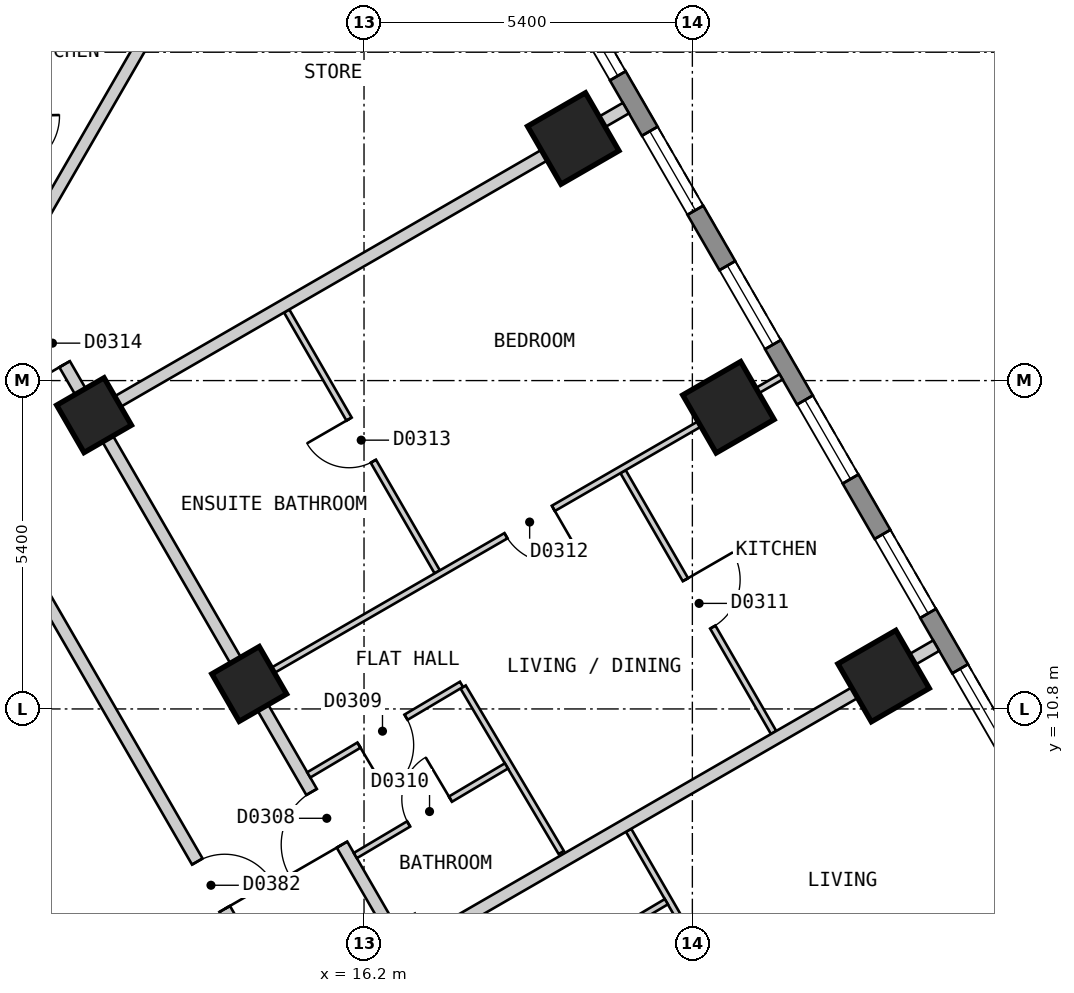
"""IFC4 building model, lengths in metres.
Left out: names, types, materials, properties, quantities, classifications, styles, units other than length and angle.
Written with IfcOpenShell. Run it as: python <this file> out.ifc"""

import sys

from ifc_helpers import new_model, si_unit, direction, frame, frame_2d, origin, origin_2d, place, context, subcontext, project, spatial, polyline, rectangle, outline, extrude, element, fill, save


model = new_model("IFC4")
c1 = context("Model", 3, precision=1e-05, world=origin(), true_north=direction((0.0, 1.0)))
c2 = subcontext(c1, "Body", "Model", "MODEL_VIEW")
j1 = project(units=[si_unit("LENGTHUNIT", "METRE"), si_unit("PLANEANGLEUNIT", "RADIAN")], contexts=[c1])
p1 = place(None, origin())
s1 = spatial("IfcSite", under=j1, at=p1, CompositionType="ELEMENT")
p2 = place(p1, origin())
s2 = spatial("IfcBuilding", under=s1, at=p2, CompositionType="ELEMENT")
p3 = place(p2, frame((0.0, 0.0, 59.4)))
s3 = spatial("IfcBuildingStorey", under=s2, at=p3, CompositionType="ELEMENT", Elevation=59.4)
for number, where, z_axis, x_axis in (
    (1, (27.297, 6.921, 0.0), (0.0, 0.0, 1.0), (-0.5, 0.866, 0.0)),
    (2, (24.745, 11.341, 0.0), (0.0, 0.0, 1.0), (-0.5, 0.866, 0.0)),
    (3, (22.193, 15.761, 0.0), (0.0, 0.0, 1.0), (-0.5, 0.866, 0.0)),
    (4, (19.641, 20.181, 0.0), (0.0, 0.0, 1.0), (-0.5, 0.866, 0.0)),
):
    element("IfcColumn", number, at=place(p3, frame(where, z_axis=z_axis, x_axis=x_axis)), inside=s3, PredefinedType="COLUMN", context=c2, shape_type="SweptSolid", body=[
        extrude(rectangle(XDim=1.1, YDim=1.1, at=origin_2d()), origin(), (0.0, 0.0, 1.0), 3.0),
    ])
for number, where, z_axis, x_axis in (
    (5, (14.312, 11.211, 0.0), (0.0, 0.0, 1.0), (-0.5, 0.866, 0.0)),
    (6, (11.76, 15.631, 0.0), (0.0, 0.0, 1.0), (-0.5, 0.866, 0.0)),
):
    element("IfcColumn", number, at=place(p3, frame(where, z_axis=z_axis, x_axis=x_axis)), inside=s3, PredefinedType="COLUMN", context=c2, shape_type="SweptSolid", body=[
        extrude(rectangle(XDim=0.9, YDim=0.9, at=origin_2d()), origin(), (0.0, 0.0, 1.0), 3.0),
    ])
p4 = place(p3, frame((31.22, 2.425, 0.0), z_axis=(0.0, 0.0, 1.0), x_axis=(-0.500001938803, 0.866024284413, 0.0)))
e7 = element("IfcWall", 7, at=p4, inside=s3, PredefinedType="SOLIDWALL", context=c2, shape_type="SweptSolid", body=[
    extrude(outline(polyline([(0.0, -0.15), (27.02, -0.15), (26.94, 0.15), (0.08, 0.15), (0.0, -0.15)])), origin(), (0.0, 0.0, 1.0), 2.6),
])
p5 = place(p4, frame((1.277, 0.0, 0.15)))
e8 = element("IfcOpeningElement", 8, at=p5, cuts=e7, PredefinedType="OPENING", context=c2, shape_type="SweptSolid", body=[
    extrude(rectangle(XDim=1.5, YDim=2.1, at=frame_2d((0.75, 1.05))), frame((0.0, 0.16, 0.0), z_axis=(0.0, -1.0, 0.0), x_axis=(1.0, 0.0, 0.0)), (0.0, 0.0, 1.0), 0.32),
])
p6 = place(p4, frame((3.829, 0.0, 0.15)))
e9 = element("IfcOpeningElement", 9, at=p6, cuts=e7, PredefinedType="OPENING", context=c2, shape_type="SweptSolid", body=[
    extrude(rectangle(XDim=1.5, YDim=2.1, at=frame_2d((0.75, 1.05))), frame((0.0, 0.16, 0.0), z_axis=(0.0, -1.0, 0.0), x_axis=(1.0, 0.0, 0.0)), (0.0, 0.0, 1.0), 0.32),
])
p7 = place(p4, frame((6.382, 0.0, 0.15)))
e10 = element("IfcOpeningElement", 10, at=p7, cuts=e7, PredefinedType="OPENING", context=c2, shape_type="SweptSolid", body=[
    extrude(rectangle(XDim=1.5, YDim=2.1, at=frame_2d((0.75, 1.05))), frame((0.0, 0.16, 0.0), z_axis=(0.0, -1.0, 0.0), x_axis=(1.0, 0.0, 0.0)), (0.0, 0.0, 1.0), 0.32),
])
p8 = place(p4, frame((8.933, 0.0, 0.15)))
e11 = element("IfcOpeningElement", 11, at=p8, cuts=e7, PredefinedType="OPENING", context=c2, shape_type="SweptSolid", body=[
    extrude(rectangle(XDim=1.5, YDim=2.1, at=frame_2d((0.75, 1.05))), frame((0.0, 0.16, 0.0), z_axis=(0.0, -1.0, 0.0), x_axis=(1.0, 0.0, 0.0)), (0.0, 0.0, 1.0), 0.32),
])
p9 = place(p4, frame((11.485, 0.0, 0.15)))
e12 = element("IfcOpeningElement", 12, at=p9, cuts=e7, PredefinedType="OPENING", context=c2, shape_type="SweptSolid", body=[
    extrude(rectangle(XDim=1.5, YDim=2.1, at=frame_2d((0.75, 1.05))), frame((0.0, 0.16, 0.0), z_axis=(0.0, -1.0, 0.0), x_axis=(1.0, 0.0, 0.0)), (0.0, 0.0, 1.0), 0.32),
])
p10 = place(p4, frame((14.037, 0.0, 0.15)))
e13 = element("IfcOpeningElement", 13, at=p10, cuts=e7, PredefinedType="OPENING", context=c2, shape_type="SweptSolid", body=[
    extrude(rectangle(XDim=1.5, YDim=2.1, at=frame_2d((0.75, 1.05))), frame((0.0, 0.16, 0.0), z_axis=(0.0, -1.0, 0.0), x_axis=(1.0, 0.0, 0.0)), (0.0, 0.0, 1.0), 0.32),
])
p11 = place(p4, frame((16.589, 0.0, 0.15)))
e14 = element("IfcOpeningElement", 14, at=p11, cuts=e7, PredefinedType="OPENING", context=c2, shape_type="SweptSolid", body=[
    extrude(rectangle(XDim=1.5, YDim=2.1, at=frame_2d((0.75, 1.05))), frame((0.0, 0.16, 0.0), z_axis=(0.0, -1.0, 0.0), x_axis=(1.0, 0.0, 0.0)), (0.0, 0.0, 1.0), 0.32),
])
p12 = place(p4, frame((19.141, 0.0, 0.15)))
e15 = element("IfcOpeningElement", 15, at=p12, cuts=e7, PredefinedType="OPENING", context=c2, shape_type="SweptSolid", body=[
    extrude(rectangle(XDim=1.5, YDim=2.1, at=frame_2d((0.75, 1.05))), frame((0.0, 0.16, 0.0), z_axis=(0.0, -1.0, 0.0), x_axis=(1.0, 0.0, 0.0)), (0.0, 0.0, 1.0), 0.32),
])
p13 = place(p4, frame((21.693, 0.0, 0.15)))
e16 = element("IfcOpeningElement", 16, at=p13, cuts=e7, PredefinedType="OPENING", context=c2, shape_type="SweptSolid", body=[
    extrude(rectangle(XDim=1.5, YDim=2.1, at=frame_2d((0.75, 1.05))), frame((0.0, 0.16, 0.0), z_axis=(0.0, -1.0, 0.0), x_axis=(1.0, 0.0, 0.0)), (0.0, 0.0, 1.0), 0.32),
])
p14 = place(p4, frame((24.244, 0.0, 0.15)))
e17 = element("IfcOpeningElement", 17, at=p14, cuts=e7, PredefinedType="OPENING", context=c2, shape_type="SweptSolid", body=[
    extrude(rectangle(XDim=1.5, YDim=2.1, at=frame_2d((0.75, 1.05))), frame((0.0, 0.16, 0.0), z_axis=(0.0, -1.0, 0.0), x_axis=(1.0, 0.0, 0.0)), (0.0, 0.0, 1.0), 0.32),
])
p15 = place(p3, frame((9.18, 15.7, 0.0), z_axis=(0.0, 0.0, 1.0), x_axis=(0.500003652032, -0.866023295272, 0.0)))
e18 = element("IfcWall", 18, at=p15, inside=s3, PredefinedType="PARTITIONING", context=c2, shape_type="SweptSolid", body=[
    extrude(rectangle(XDim=18.012, YDim=0.2, at=frame_2d((9.006, 0.0))), origin(), (0.0, 0.0, 1.0), 2.6),
])
p16 = place(p15, frame((8.556, 0.0, 0.0)))
e19 = element("IfcOpeningElement", 19, at=p16, cuts=e18, PredefinedType="OPENING", context=c2, shape_type="SweptSolid", body=[
    extrude(rectangle(XDim=0.9, YDim=2.1, at=frame_2d((0.45, 1.05))), frame((0.0, 0.11, 0.0), z_axis=(0.0, -1.0, 0.0), x_axis=(1.0, 0.0, 0.0)), (0.0, 0.0, 1.0), 0.22),
])
p17 = place(p3, frame((10.45, 17.9, 0.0), z_axis=(0.0, 0.0, 1.0), x_axis=(0.500034352617, -0.866005569383, 0.0)))
e20 = element("IfcWall", 20, at=p17, inside=s3, PredefinedType="PARTITIONING", context=c2, shape_type="SweptSolid", body=[
    extrude(rectangle(XDim=20.553, YDim=0.2, at=frame_2d((10.276, 0.0))), origin(), (0.0, 0.0, 1.0), 2.6),
])
p18 = place(p17, frame((14.903, 0.0, 0.0)))
e21 = element("IfcOpeningElement", 21, at=p18, cuts=e20, PredefinedType="OPENING", context=c2, shape_type="SweptSolid", body=[
    extrude(rectangle(XDim=1.0, YDim=2.1, at=frame_2d((0.5, 1.05))), frame((0.0, 0.11, 0.0), z_axis=(0.0, -1.0, 0.0), x_axis=(1.0, 0.0, 0.0)), (0.0, 0.0, 1.0), 0.22),
])
p19 = place(p17, frame((9.775, 0.0, 0.0)))
e22 = element("IfcOpeningElement", 22, at=p19, cuts=e20, PredefinedType="OPENING", context=c2, shape_type="SweptSolid", body=[
    extrude(rectangle(XDim=1.0, YDim=2.1, at=frame_2d((0.5, 1.05))), frame((0.0, 0.11, 0.0), z_axis=(0.0, -1.0, 0.0), x_axis=(1.0, 0.0, 0.0)), (0.0, 0.0, 1.0), 0.22),
])
p20 = place(p17, frame((0.852, 0.0, 0.0)))
e23 = element("IfcOpeningElement", 23, at=p20, cuts=e20, PredefinedType="OPENING", context=c2, shape_type="SweptSolid", body=[
    extrude(rectangle(XDim=0.8, YDim=2.1, at=frame_2d((0.4, 1.05))), frame((0.0, 0.11, 0.0), z_axis=(0.0, -1.0, 0.0), x_axis=(1.0, 0.0, 0.0)), (0.0, 0.0, 1.0), 0.22),
])
p21 = place(p3, frame((17.83, 11.161, 0.0), z_axis=(0.0, 0.0, 1.0), x_axis=(0.510041341082, -0.860149888326, 0.0)))
e24 = element("IfcWall", 24, at=p21, inside=s3, PredefinedType="PARTITIONING", context=c2, shape_type="SweptSolid", body=[
    extrude(rectangle(XDim=3.165, YDim=0.1, at=frame_2d((1.582, 0.0))), origin(), (0.0, 0.0, 1.0), 2.6),
])
p22 = place(p3, frame((14.928, 17.344, 0.0), z_axis=(0.0, 0.0, 1.0), x_axis=(0.499881743012, -0.866093668724, 0.0)))
e25 = element("IfcWall", 25, at=p22, inside=s3, PredefinedType="PARTITIONING", context=c2, shape_type="SweptSolid", body=[
    extrude(rectangle(XDim=4.953, YDim=0.1, at=frame_2d((2.477, 0.0))), origin(), (0.0, 0.0, 1.0), 2.6),
])
p23 = place(p22, frame((2.052, 0.0, 0.0)))
e26 = element("IfcOpeningElement", 26, at=p23, cuts=e25, PredefinedType="OPENING", context=c2, shape_type="SweptSolid", body=[
    extrude(rectangle(XDim=0.8, YDim=2.1, at=frame_2d((0.4, 1.05))), frame((0.0, 0.06, 0.0), z_axis=(0.0, -1.0, 0.0), x_axis=(1.0, 0.0, 0.0)), (0.0, 0.0, 1.0), 0.12),
])
p24 = place(p3, frame((20.551, 8.805, 0.0), z_axis=(0.0, 0.0, 1.0), x_axis=(0.499984387913, -0.86603441724, 0.0)))
e27 = element("IfcWall", 27, at=p24, inside=s3, PredefinedType="PARTITIONING", context=c2, shape_type="SweptSolid", body=[
    extrude(rectangle(XDim=10.058, YDim=0.1, at=frame_2d((5.029, 0.0))), origin(), (0.0, 0.0, 1.0), 2.6),
])
p25 = place(p24, frame((1.978, 0.0, 0.0)))
e28 = element("IfcOpeningElement", 28, at=p25, cuts=e27, PredefinedType="OPENING", context=c2, shape_type="SweptSolid", body=[
    extrude(rectangle(XDim=0.9, YDim=2.1, at=frame_2d((0.45, 1.05))), frame((0.0, 0.06, 0.0), z_axis=(0.0, -1.0, 0.0), x_axis=(1.0, 0.0, 0.0)), (0.0, 0.0, 1.0), 0.12),
])
p26 = place(p24, frame((7.157, 0.0, 0.0)))
e29 = element("IfcOpeningElement", 29, at=p26, cuts=e27, PredefinedType="OPENING", context=c2, shape_type="SweptSolid", body=[
    extrude(rectangle(XDim=0.8, YDim=2.1, at=frame_2d((0.4, 1.05))), frame((0.0, 0.06, 0.0), z_axis=(0.0, -1.0, 0.0), x_axis=(1.0, 0.0, 0.0)), (0.0, 0.0, 1.0), 0.12),
])
p27 = place(p3, frame((20.46, 14.703, 0.0), z_axis=(0.0, 0.0, 1.0), x_axis=(0.499903082856, -0.866081351693, 0.0)))
e30 = element("IfcWall", 30, at=p27, inside=s3, PredefinedType="PARTITIONING", context=c2, shape_type="SweptSolid", body=[
    extrude(rectangle(XDim=4.953, YDim=0.1, at=frame_2d((2.477, 0.0))), origin(), (0.0, 0.0, 1.0), 2.6),
])
p28 = place(p27, frame((2.052, 0.0, 0.0)))
e31 = element("IfcOpeningElement", 31, at=p28, cuts=e30, PredefinedType="OPENING", context=c2, shape_type="SweptSolid", body=[
    extrude(rectangle(XDim=0.9, YDim=2.1, at=frame_2d((0.45, 1.05))), frame((0.0, 0.06, 0.0), z_axis=(0.0, -1.0, 0.0), x_axis=(1.0, 0.0, 0.0)), (0.0, 0.0, 1.0), 0.12),
])
p29 = place(p3, frame((14.399, 11.261, 0.0), z_axis=(0.0, 0.0, 1.0), x_axis=(0.866022959057, 0.500004234368, 0.0)))
e32 = element("IfcWall", 32, at=p29, inside=s3, PredefinedType="PARTITIONING", context=c2, shape_type="SweptSolid", body=[
    extrude(rectangle(XDim=10.0, YDim=0.1, at=frame_2d((5.0, 0.0))), origin(), (0.0, 0.0, 1.0), 2.6),
])
p30 = place(p29, frame((4.775, 0.0, 0.0)))
e33 = element("IfcOpeningElement", 33, at=p30, cuts=e32, PredefinedType="OPENING", context=c2, shape_type="SweptSolid", body=[
    extrude(rectangle(XDim=0.9, YDim=2.1, at=frame_2d((0.45, 1.05))), frame((0.0, 0.06, 0.0), z_axis=(0.0, -1.0, 0.0), x_axis=(1.0, 0.0, 0.0)), (0.0, 0.0, 1.0), 0.12),
])
p31 = place(p3, frame((17.688, 5.563, 0.0), z_axis=(0.0, 0.0, 1.0), x_axis=(0.860050619918, 0.510208713351, 0.0)))
e34 = element("IfcWall", 34, at=p31, inside=s3, PredefinedType="PARTITIONING", context=c2, shape_type="SweptSolid", body=[
    extrude(rectangle(XDim=4.051, YDim=0.1, at=frame_2d((2.025, 0.0))), origin(), (0.0, 0.0, 1.0), 2.6),
])
p32 = place(p31, frame((1.55, 0.0, 0.0)))
e35 = element("IfcOpeningElement", 35, at=p32, cuts=e34, PredefinedType="OPENING", context=c2, shape_type="SweptSolid", body=[
    extrude(rectangle(XDim=0.9, YDim=2.1, at=frame_2d((0.45, 1.05))), frame((0.0, 0.06, 0.0), z_axis=(0.0, -1.0, 0.0), x_axis=(1.0, 0.0, 0.0)), (0.0, 0.0, 1.0), 0.12),
])
p33 = place(p3, frame((16.057, 8.389, 0.0), z_axis=(0.0, 0.0, 1.0), x_axis=(0.860069107001, 0.510177548686, 0.0)))
e36 = element("IfcWall", 36, at=p33, inside=s3, PredefinedType="PARTITIONING", context=c2, shape_type="SweptSolid", body=[
    extrude(rectangle(XDim=2.889, YDim=0.1, at=frame_2d((1.445, 0.0))), origin(), (0.0, 0.0, 1.0), 2.6),
])
p34 = place(p33, frame((1.019, 0.0, 0.0)))
e37 = element("IfcOpeningElement", 37, at=p34, cuts=e36, PredefinedType="OPENING", context=c2, shape_type="SweptSolid", body=[
    extrude(rectangle(XDim=0.8, YDim=2.1, at=frame_2d((0.4, 1.05))), frame((0.0, 0.06, 0.0), z_axis=(0.0, -1.0, 0.0), x_axis=(1.0, 0.0, 0.0)), (0.0, 0.0, 1.0), 0.12),
])
p35 = place(p3, frame((15.291, 9.715, 0.0), z_axis=(0.0, 0.0, 1.0), x_axis=(0.860078277555, 0.510162088436, 0.0)))
e38 = element("IfcWall", 38, at=p35, inside=s3, PredefinedType="PARTITIONING", context=c2, shape_type="SweptSolid", body=[
    extrude(rectangle(XDim=2.921, YDim=0.1, at=frame_2d((1.46, 0.0))), origin(), (0.0, 0.0, 1.0), 2.6),
])
p36 = place(p35, frame((0.96, 0.0, 0.0)))
e39 = element("IfcOpeningElement", 39, at=p36, cuts=e38, PredefinedType="OPENING", context=c2, shape_type="SweptSolid", body=[
    extrude(rectangle(XDim=0.9, YDim=2.1, at=frame_2d((0.45, 1.05))), frame((0.0, 0.06, 0.0), z_axis=(0.0, -1.0, 0.0), x_axis=(1.0, 0.0, 0.0)), (0.0, 0.0, 1.0), 0.12),
])
p37 = place(p3, frame((10.393, 18.0, 0.0), z_axis=(0.0, 0.0, 1.0), x_axis=(0.499945497007, 0.866056868816, 0.0)))
e40 = element("IfcWall", 40, at=p37, inside=s3, PredefinedType="PARTITIONING", context=c2, shape_type="SweptSolid", body=[
    extrude(rectangle(XDim=10.265, YDim=0.2, at=frame_2d((5.132, 0.0))), origin(), (0.0, 0.0, 1.0), 2.6),
])
for number, where, z_axis, x_axis in (
    (41, (16.95, 6.841, 0.0), (0.0, 0.0, 1.0), (0.866, 0.5, 0.0)),
    (42, (11.847, 15.681, 0.0), (0.0, 0.0, 1.0), (0.866, 0.5, 0.0)),
):
    element("IfcWall", number, at=place(p3, frame(where, z_axis=z_axis, x_axis=x_axis)), inside=s3, PredefinedType="PARTITIONING", context=c2, shape_type="SweptSolid", body=[
        extrude(rectangle(XDim=10.0, YDim=0.2, at=frame_2d((5.0, 0.0))), origin(), (0.0, 0.0, 1.0), 2.6),
    ])
p38 = place(p3, frame((23.053, 4.47, 0.0), z_axis=(0.0, 0.0, 1.0), x_axis=(0.866052608538, 0.499952877023, 0.0)))
e43 = element("IfcWall", 43, at=p38, inside=s3, PredefinedType="PARTITIONING", context=c2, shape_type="SweptSolid", body=[
    extrude(rectangle(XDim=5.9, YDim=0.1, at=frame_2d((2.95, 0.0))), origin(), (0.0, 0.0, 1.0), 2.6),
])
p39 = place(p38, frame((2.501, 0.0, 0.0)))
e44 = element("IfcOpeningElement", 44, at=p39, cuts=e43, PredefinedType="OPENING", context=c2, shape_type="SweptSolid", body=[
    extrude(rectangle(XDim=0.9, YDim=2.1, at=frame_2d((0.45, 1.05))), frame((0.0, 0.06, 0.0), z_axis=(0.0, -1.0, 0.0), x_axis=(1.0, 0.0, 0.0)), (0.0, 0.0, 1.0), 0.12),
])
p40 = place(p8, origin())
e45 = element("IfcWindow", 45, at=p40, inside=s3, PartitioningType="SINGLE_PANEL", PredefinedType="WINDOW", context=c2, shape_type="SweptSolid", body=[
    extrude(rectangle(XDim=1.5, YDim=2.1, at=frame_2d((0.75, 1.05))), frame((0.0, 0.03, 0.0), z_axis=(0.0, -1.0, 0.0), x_axis=(1.0, 0.0, 0.0)), (0.0, 0.0, 1.0), 0.06),
])
fill(e11, e45)
p41 = place(p9, origin())
e46 = element("IfcWindow", 46, at=p41, inside=s3, PartitioningType="SINGLE_PANEL", PredefinedType="WINDOW", context=c2, shape_type="SweptSolid", body=[
    extrude(rectangle(XDim=1.5, YDim=2.1, at=frame_2d((0.75, 1.05))), frame((0.0, 0.03, 0.0), z_axis=(0.0, -1.0, 0.0), x_axis=(1.0, 0.0, 0.0)), (0.0, 0.0, 1.0), 0.06),
])
fill(e12, e46)
p42 = place(p10, origin())
e47 = element("IfcWindow", 47, at=p42, inside=s3, PartitioningType="SINGLE_PANEL", PredefinedType="WINDOW", context=c2, shape_type="SweptSolid", body=[
    extrude(rectangle(XDim=1.5, YDim=2.1, at=frame_2d((0.75, 1.05))), frame((0.0, 0.03, 0.0), z_axis=(0.0, -1.0, 0.0), x_axis=(1.0, 0.0, 0.0)), (0.0, 0.0, 1.0), 0.06),
])
fill(e13, e47)
p43 = place(p11, origin())
e48 = element("IfcWindow", 48, at=p43, inside=s3, PartitioningType="SINGLE_PANEL", PredefinedType="WINDOW", context=c2, shape_type="SweptSolid", body=[
    extrude(rectangle(XDim=1.5, YDim=2.1, at=frame_2d((0.75, 1.05))), frame((0.0, 0.03, 0.0), z_axis=(0.0, -1.0, 0.0), x_axis=(1.0, 0.0, 0.0)), (0.0, 0.0, 1.0), 0.06),
])
fill(e14, e48)
p44 = place(p12, origin())
e49 = element("IfcWindow", 49, at=p44, inside=s3, PartitioningType="SINGLE_PANEL", PredefinedType="WINDOW", context=c2, shape_type="SweptSolid", body=[
    extrude(rectangle(XDim=1.5, YDim=2.1, at=frame_2d((0.75, 1.05))), frame((0.0, 0.03, 0.0), z_axis=(0.0, -1.0, 0.0), x_axis=(1.0, 0.0, 0.0)), (0.0, 0.0, 1.0), 0.06),
])
fill(e15, e49)
p45 = place(p13, origin())
e50 = element("IfcWindow", 50, at=p45, inside=s3, PartitioningType="SINGLE_PANEL", PredefinedType="WINDOW", context=c2, shape_type="SweptSolid", body=[
    extrude(rectangle(XDim=1.5, YDim=2.1, at=frame_2d((0.75, 1.05))), frame((0.0, 0.03, 0.0), z_axis=(0.0, -1.0, 0.0), x_axis=(1.0, 0.0, 0.0)), (0.0, 0.0, 1.0), 0.06),
])
fill(e16, e50)
p46 = place(p19, origin())
e51 = element("IfcDoor", 51, at=p46, inside=s3, OperationType="SINGLE_SWING_RIGHT", PredefinedType="DOOR", context=c2, shape_type="SweptSolid", body=[
    extrude(rectangle(XDim=1.0, YDim=2.1, at=frame_2d((0.5, 1.05))), frame((0.0, 0.025, 0.0), z_axis=(0.0, -1.0, 0.0), x_axis=(1.0, 0.0, 0.0)), (0.0, 0.0, 1.0), 0.05),
])
fill(e22, e51)
p47 = place(p36, origin())
e52 = element("IfcDoor", 52, at=p47, inside=s3, OperationType="SINGLE_SWING_LEFT", PredefinedType="DOOR", context=c2, shape_type="SweptSolid", body=[
    extrude(rectangle(XDim=0.9, YDim=2.1, at=frame_2d((0.45, 1.05))), frame((0.0, 0.025, 0.0), z_axis=(0.0, -1.0, 0.0), x_axis=(1.0, 0.0, 0.0)), (0.0, 0.0, 1.0), 0.05),
])
fill(e39, e52)
p48 = place(p34, origin())
e53 = element("IfcDoor", 53, at=p48, inside=s3, OperationType="SINGLE_SWING_RIGHT", PredefinedType="DOOR", context=c2, shape_type="SweptSolid", body=[
    extrude(rectangle(XDim=0.8, YDim=2.1, at=frame_2d((0.4, 1.05))), frame((0.0, 0.025, 0.0), z_axis=(0.0, -1.0, 0.0), x_axis=(1.0, 0.0, 0.0)), (0.0, 0.0, 1.0), 0.05),
])
fill(e37, e53)
p49 = place(p28, origin())
e54 = element("IfcDoor", 54, at=p49, inside=s3, OperationType="SINGLE_SWING_LEFT", PredefinedType="DOOR", context=c2, shape_type="SweptSolid", body=[
    extrude(rectangle(XDim=0.9, YDim=2.1, at=frame_2d((0.45, 1.05))), frame((0.0, 0.025, 0.0), z_axis=(0.0, -1.0, 0.0), x_axis=(1.0, 0.0, 0.0)), (0.0, 0.0, 1.0), 0.05),
])
fill(e31, e54)
p50 = place(p30, origin())
e55 = element("IfcDoor", 55, at=p50, inside=s3, OperationType="SINGLE_SWING_RIGHT", PredefinedType="DOOR", context=c2, shape_type="SweptSolid", body=[
    extrude(rectangle(XDim=0.9, YDim=2.1, at=frame_2d((0.45, 1.05))), frame((0.0, 0.025, 0.0), z_axis=(0.0, -1.0, 0.0), x_axis=(1.0, 0.0, 0.0)), (0.0, 0.0, 1.0), 0.05),
])
fill(e33, e55)
p51 = place(p23, origin())
e56 = element("IfcDoor", 56, at=p51, inside=s3, OperationType="SINGLE_SWING_LEFT", PredefinedType="DOOR", context=c2, shape_type="SweptSolid", body=[
    extrude(rectangle(XDim=0.8, YDim=2.1, at=frame_2d((0.4, 1.05))), frame((0.0, 0.025, 0.0), z_axis=(0.0, -1.0, 0.0), x_axis=(1.0, 0.0, 0.0)), (0.0, 0.0, 1.0), 0.05),
])
fill(e26, e56)
p52 = place(p20, origin())
e57 = element("IfcDoor", 57, at=p52, inside=s3, OperationType="SINGLE_SWING_RIGHT", PredefinedType="DOOR", context=c2, shape_type="SweptSolid", body=[
    extrude(rectangle(XDim=0.8, YDim=2.1, at=frame_2d((0.4, 1.05))), frame((0.0, 0.025, 0.0), z_axis=(0.0, -1.0, 0.0), x_axis=(1.0, 0.0, 0.0)), (0.0, 0.0, 1.0), 0.05),
])
fill(e23, e57)
p53 = place(p16, origin())
e58 = element("IfcDoor", 58, at=p53, inside=s3, OperationType="SINGLE_SWING_RIGHT", PredefinedType="DOOR", context=c2, shape_type="SweptSolid", body=[
    extrude(rectangle(XDim=0.9, YDim=2.1, at=frame_2d((0.45, 1.05))), frame((0.0, 0.025, 0.0), z_axis=(0.0, -1.0, 0.0), x_axis=(1.0, 0.0, 0.0)), (0.0, 0.0, 1.0), 0.05),
])
fill(e19, e58)
save(model, sys.argv[1])
